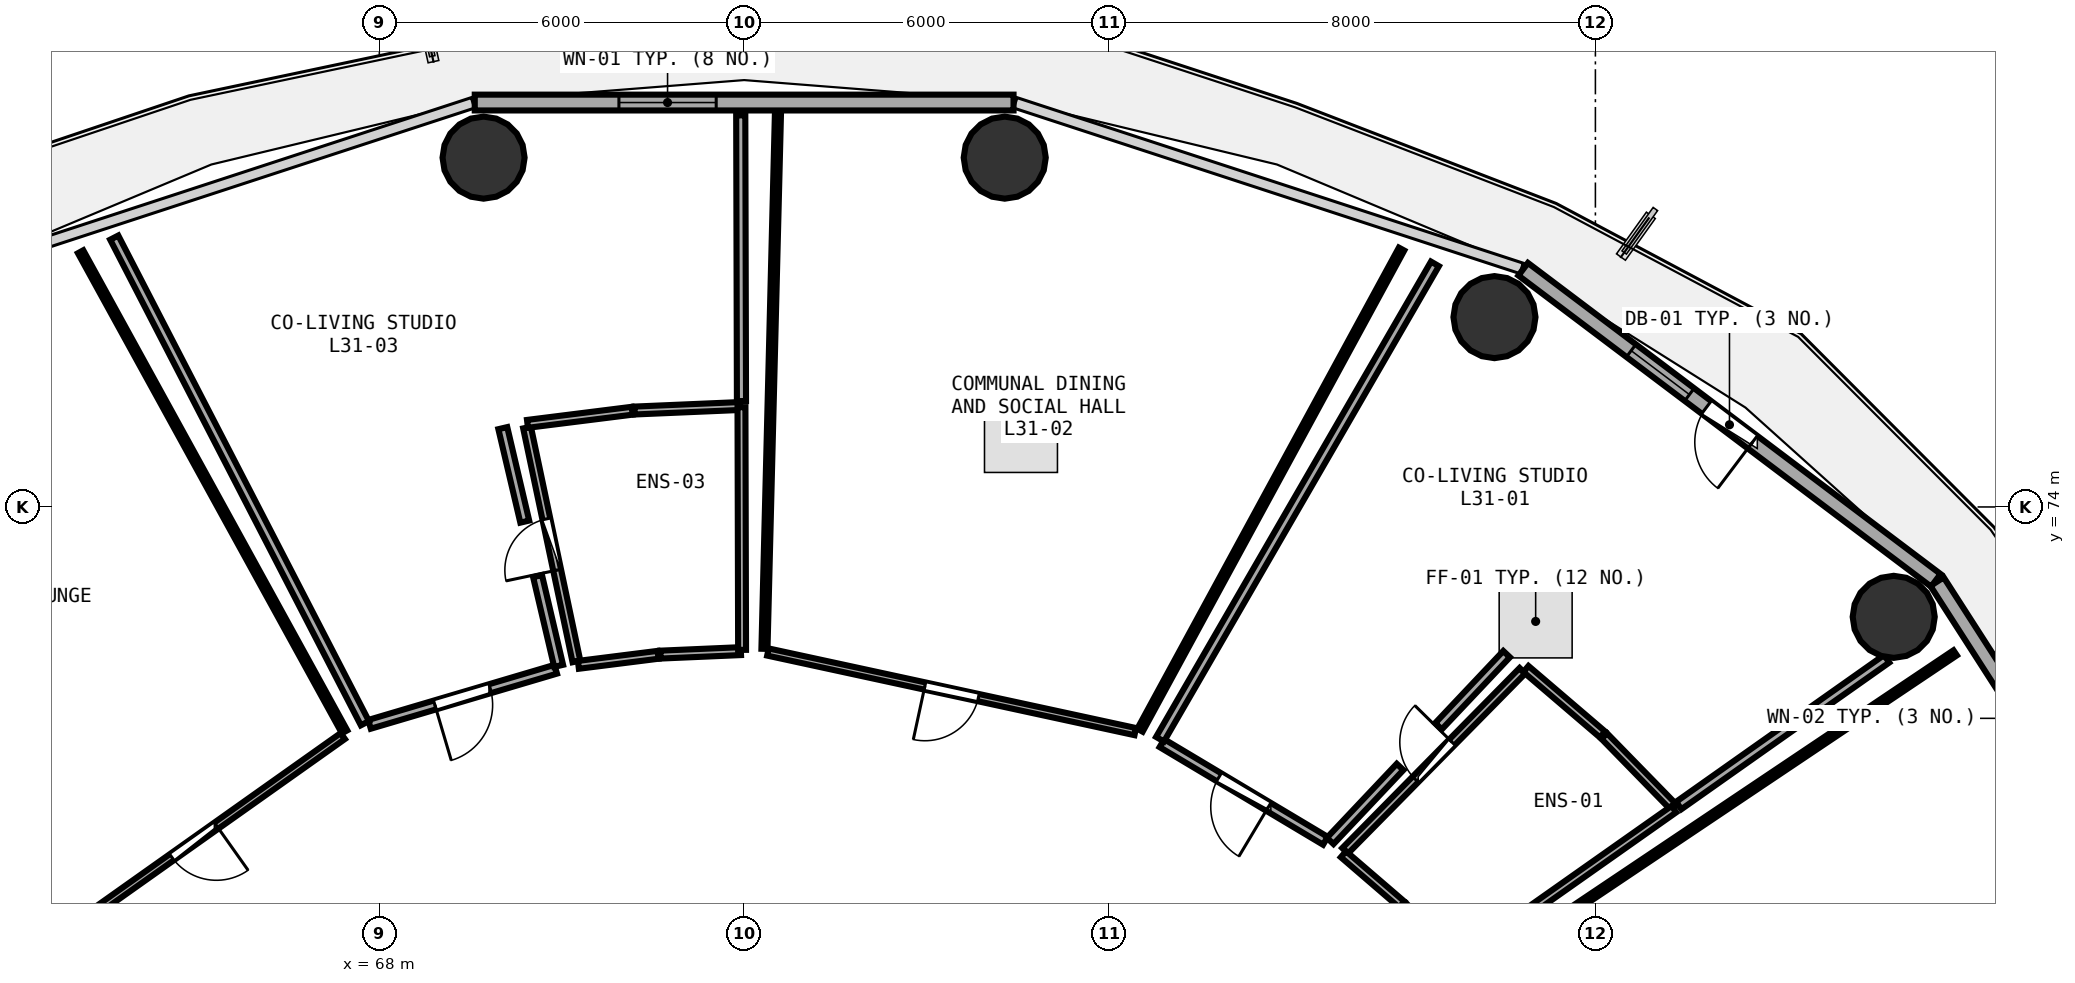
"""IFC4 building model, lengths in metres.
Left out: names, types, materials, properties, quantities, classifications, styles, units other than length and angle.
Written with IfcOpenShell. Run it as: python <this file> out.ifc"""

import sys

from ifc_helpers import new_model, si_unit, direction, frame, frame_2d, origin, origin_2d, place, context, subcontext, project, spatial, rectangle, circle, extrude, element, fill, save


model = new_model("IFC4")
c1 = context("Model", 3, precision=1e-05, world=origin(), true_north=direction((0.0, 1.0)))
c2 = subcontext(c1, "Body", "Model", "MODEL_VIEW")
j1 = project(units=[si_unit("LENGTHUNIT", "METRE"), si_unit("PLANEANGLEUNIT", "RADIAN")], contexts=[c1])
p1 = place(None, origin())
s1 = spatial("IfcSite", under=j1, at=p1, CompositionType="ELEMENT")
p2 = place(p1, origin())
s2 = spatial("IfcBuilding", under=s1, at=p2, CompositionType="ELEMENT")
p3 = place(p2, frame((0.0, 0.0, 121.35)))
s3 = spatial("IfcBuildingStorey", under=s2, at=p3, CompositionType="ELEMENT", Elevation=121.35)
for number, where, z_axis, x_axis in (
    (1, (92.906, 72.193, 0.0), (0.0, 0.0, 1.0), (1.0, 0.0, 0.0)),
    (2, (86.34, 77.122, 0.0), (0.0, 0.0, 1.0), (1.0, 0.0, 0.0)),
    (3, (78.286, 79.745, 0.0), (0.0, 0.0, 1.0), (1.0, 0.0, 0.0)),
    (4, (69.714, 79.745, 0.0), (0.0, 0.0, 1.0), (1.0, 0.0, 0.0)),
):
    element("IfcColumn", number, at=place(p3, frame(where, z_axis=z_axis, x_axis=x_axis)), inside=s3, PredefinedType="COLUMN", context=c2, shape_type="SweptSolid", body=[
        extrude(circle(Radius=0.675, at=origin_2d()), origin(), (0.0, 0.0, 1.0), 3.75),
    ])
p4 = place(p3, frame((98.048, 65.879, 0.0), z_axis=(0.0, 0.0, 1.0), x_axis=(-0.540620528459, 0.841266571432, 0.0)))
e5 = element("IfcWall", 5, at=p4, inside=s3, PredefinedType="SOLIDWALL", context=c2, shape_type="SweptSolid", body=[
    extrude(rectangle(XDim=8.193, YDim=0.26, at=frame_2d((4.096, 0.0))), origin(), (0.0, 0.0, 1.0), 3.475),
])
p5 = place(p4, frame((3.621, 0.0, 0.0)))
e6 = element("IfcOpeningElement", 6, at=p5, cuts=e5, PredefinedType="OPENING", context=c2, shape_type="SweptSolid", body=[
    extrude(rectangle(XDim=0.95, YDim=2.1, at=frame_2d((0.475, 1.05))), frame((0.0, 0.14, 0.0), z_axis=(0.0, -1.0, 0.0), x_axis=(1.0, 0.0, 0.0)), (0.0, 0.0, 1.0), 0.28),
])
p6 = place(p4, frame((4.921, 0.0, 0.85)))
e7 = element("IfcOpeningElement", 7, at=p6, cuts=e5, PredefinedType="OPENING", context=c2, shape_type="SweptSolid", body=[
    extrude(rectangle(XDim=1.2, YDim=1.45, at=frame_2d((0.6, 0.725))), frame((0.0, 0.14, 0.0), z_axis=(0.0, -1.0, 0.0), x_axis=(1.0, 0.0, 0.0)), (0.0, 0.0, 1.0), 0.28),
])
p7 = place(p3, frame((93.599, 72.793, 0.0), z_axis=(0.0, 0.0, 1.0), x_axis=(-0.798501507879, 0.601992808857, 0.0)))
e8 = element("IfcWall", 8, at=p7, inside=s3, PredefinedType="SOLIDWALL", context=c2, shape_type="SweptSolid", body=[
    extrude(rectangle(XDim=8.499, YDim=0.26, at=frame_2d((4.25, 0.0))), origin(), (0.0, 0.0, 1.0), 3.475),
])
p8 = place(p7, frame((3.775, 0.0, 0.0)))
e9 = element("IfcOpeningElement", 9, at=p8, cuts=e8, PredefinedType="OPENING", context=c2, shape_type="SweptSolid", body=[
    extrude(rectangle(XDim=0.95, YDim=2.1, at=frame_2d((0.475, 1.05))), frame((0.0, 0.14, 0.0), z_axis=(0.0, -1.0, 0.0), x_axis=(1.0, 0.0, 0.0)), (0.0, 0.0, 1.0), 0.28),
])
p9 = place(p7, frame((5.075, 0.0, 0.85)))
e10 = element("IfcOpeningElement", 10, at=p9, cuts=e8, PredefinedType="OPENING", context=c2, shape_type="SweptSolid", body=[
    extrude(rectangle(XDim=1.2, YDim=1.45, at=frame_2d((0.6, 0.725))), frame((0.0, 0.14, 0.0), z_axis=(0.0, -1.0, 0.0), x_axis=(1.0, 0.0, 0.0)), (0.0, 0.0, 1.0), 0.28),
])
p10 = place(p3, frame((78.43, 80.651, 0.0), z_axis=(0.0, 0.0, 1.0), x_axis=(-1.0, 0.0, 0.0)))
e11 = element("IfcWall", 11, at=p10, inside=s3, PredefinedType="SOLIDWALL", context=c2, shape_type="SweptSolid", body=[
    extrude(rectangle(XDim=8.861, YDim=0.26, at=frame_2d((4.43, 0.0))), origin(), (0.0, 0.0, 1.0), 3.475),
])
p11 = place(p10, frame((4.89, 0.0, 0.85)))
e12 = element("IfcOpeningElement", 12, at=p11, cuts=e11, PredefinedType="OPENING", context=c2, shape_type="SweptSolid", body=[
    extrude(rectangle(XDim=1.6, YDim=1.45, at=frame_2d((0.8, 0.725))), frame((0.0, 0.14, 0.0), z_axis=(0.0, -1.0, 0.0), x_axis=(1.0, 0.0, 0.0)), (0.0, 0.0, 1.0), 0.28),
])
p12 = place(p3, frame((83.883, 68.345, 0.0), z_axis=(0.0, 0.0, 1.0), x_axis=(0.70168270288, 0.712489567979, 0.0)))
e13 = element("IfcWall", 13, at=p12, inside=s3, PredefinedType="PLUMBINGWALL", context=c2, shape_type="SweptSolid", body=[
    extrude(rectangle(XDim=4.157, YDim=0.13, at=frame_2d((2.078, 0.0))), origin(), (0.0, 0.0, 1.0), 3.175),
])
p13 = place(p12, frame((1.648, 0.0, 0.0)))
e14 = element("IfcOpeningElement", 14, at=p13, cuts=e13, PredefinedType="OPENING", context=c2, shape_type="SweptSolid", body=[
    extrude(rectangle(XDim=0.86, YDim=2.05, at=frame_2d((0.43, 1.025))), frame((0.0, 0.075, 0.0), z_axis=(0.0, -1.0, 0.0), x_axis=(1.0, 0.0, 0.0)), (0.0, 0.0, 1.0), 0.15),
])
p14 = place(p3, frame((83.56, 68.51, 0.0), z_axis=(0.0, 0.0, 1.0), x_axis=(-0.858523244826, 0.512774646501, 0.0)))
e15 = element("IfcWall", 15, at=p14, inside=s3, PredefinedType="PARTITIONING", context=c2, shape_type="SweptSolid", body=[
    extrude(rectangle(XDim=3.131, YDim=0.15, at=frame_2d((1.565, 0.0))), origin(), (0.0, 0.0, 1.0), 2.925),
])
p15 = place(p14, frame((1.09, 0.0, 0.0)))
e16 = element("IfcOpeningElement", 16, at=p15, cuts=e15, PredefinedType="OPENING", context=c2, shape_type="SweptSolid", body=[
    extrude(rectangle(XDim=0.95, YDim=2.08, at=frame_2d((0.475, 1.04))), frame((0.0, 0.085, 0.0), z_axis=(0.0, -1.0, 0.0), x_axis=(1.0, 0.0, 0.0)), (0.0, 0.0, 1.0), 0.17),
])
p16 = place(p3, frame((80.432, 70.306, 0.0), z_axis=(0.0, 0.0, 1.0), x_axis=(-0.977331177519, 0.211716247484, 0.0)))
e17 = element("IfcWall", 17, at=p16, inside=s3, PredefinedType="PARTITIONING", context=c2, shape_type="SweptSolid", body=[
    extrude(rectangle(XDim=6.181, YDim=0.12, at=frame_2d((3.09, 0.0))), origin(), (0.0, 0.0, 1.0), 3.235),
])
p17 = place(p16, frame((2.64, 0.0, 0.0)))
e18 = element("IfcOpeningElement", 18, at=p17, cuts=e17, PredefinedType="OPENING", context=c2, shape_type="SweptSolid", body=[
    extrude(rectangle(XDim=0.9, YDim=2.08, at=frame_2d((0.45, 1.04))), frame((0.0, 0.07, 0.0), z_axis=(0.0, -1.0, 0.0), x_axis=(1.0, 0.0, 0.0)), (0.0, 0.0, 1.0), 0.14),
])
p18 = place(p3, frame((71.242, 71.46, 0.0), z_axis=(0.0, 0.0, 1.0), x_axis=(-0.206652168131, 0.97841447322, 0.0)))
e19 = element("IfcWall", 19, at=p18, inside=s3, PredefinedType="PLUMBINGWALL", context=c2, shape_type="SweptSolid", body=[
    extrude(rectangle(XDim=3.931, YDim=0.13, at=frame_2d((1.965, 0.0))), origin(), (0.0, 0.0, 1.0), 2.925),
])
p19 = place(p18, frame((1.535, 0.0, 0.0)))
e20 = element("IfcOpeningElement", 20, at=p19, cuts=e19, PredefinedType="OPENING", context=c2, shape_type="SweptSolid", body=[
    extrude(rectangle(XDim=0.86, YDim=2.05, at=frame_2d((0.43, 1.025))), frame((0.0, 0.075, 0.0), z_axis=(0.0, -1.0, 0.0), x_axis=(1.0, 0.0, 0.0)), (0.0, 0.0, 1.0), 0.15),
])
p20 = place(p3, frame((70.9, 71.331, 0.0), z_axis=(0.0, 0.0, 1.0), x_axis=(-0.958905255717, -0.283726471373, 0.0)))
e21 = element("IfcWall", 21, at=p20, inside=s3, PredefinedType="PARTITIONING", context=c2, shape_type="SweptSolid", body=[
    extrude(rectangle(XDim=3.193, YDim=0.15, at=frame_2d((1.597, 0.0))), origin(), (0.0, 0.0, 1.0), 2.925),
])
p21 = place(p20, frame((1.122, 0.0, 0.0)))
e22 = element("IfcOpeningElement", 22, at=p21, cuts=e21, PredefinedType="OPENING", context=c2, shape_type="SweptSolid", body=[
    extrude(rectangle(XDim=0.95, YDim=2.08, at=frame_2d((0.475, 1.04))), frame((0.0, 0.085, 0.0), z_axis=(0.0, -1.0, 0.0), x_axis=(1.0, 0.0, 0.0)), (0.0, 0.0, 1.0), 0.17),
])
p22 = place(p3, frame((67.399, 70.232, 0.0), z_axis=(0.0, 0.0, 1.0), x_axis=(-0.815932399176, -0.578147316846, 0.0)))
e23 = element("IfcWall", 23, at=p22, inside=s3, PredefinedType="PARTITIONING", context=c2, shape_type="SweptSolid", body=[
    extrude(rectangle(XDim=5.993, YDim=0.12, at=frame_2d((2.997, 0.0))), origin(), (0.0, 0.0, 1.0), 2.925),
])
p23 = place(p22, frame((2.546, 0.0, 0.0)))
e24 = element("IfcOpeningElement", 24, at=p23, cuts=e23, PredefinedType="OPENING", context=c2, shape_type="SweptSolid", body=[
    extrude(rectangle(XDim=0.9, YDim=2.08, at=frame_2d((0.45, 1.04))), frame((0.0, 0.07, 0.0), z_axis=(0.0, -1.0, 0.0), x_axis=(1.0, 0.0, 0.0)), (0.0, 0.0, 1.0), 0.14),
])
p24 = place(p3, frame((85.716, 66.536, 0.0), z_axis=(0.0, 0.0, 1.0), x_axis=(-0.695817197704, 0.718218927194, 0.0)))
e25 = element("IfcWall", 25, at=p24, inside=s3, PredefinedType="PLUMBINGWALL", context=c2, shape_type="SweptSolid", body=[
    extrude(rectangle(XDim=1.253, YDim=0.13, at=frame_2d((0.627, 0.0))), origin(), (0.0, 0.0, 1.0), 2.925),
])
p25 = place(p3, frame((84.815, 67.464, 0.0), z_axis=(0.0, 0.0, 1.0), x_axis=(-0.757933178543, 0.652332198242, 0.0)))
e26 = element("IfcWall", 26, at=p25, inside=s3, PredefinedType="PLUMBINGWALL", context=c2, shape_type="SweptSolid", body=[
    extrude(rectangle(XDim=1.265, YDim=0.13, at=frame_2d((0.632, 0.0))), origin(), (0.0, 0.0, 1.0), 3.48),
])
p26 = place(p3, frame((86.857, 71.336, 0.0), z_axis=(0.0, 0.0, 1.0), x_axis=(0.760056789813, -0.649856658241, 0.0)))
e27 = element("IfcWall", 27, at=p26, inside=s3, PredefinedType="PLUMBINGWALL", context=c2, shape_type="SweptSolid", body=[
    extrude(rectangle(XDim=1.657, YDim=0.13, at=frame_2d((0.829, 0.0))), origin(), (0.0, 0.0, 1.0), 3.48),
])
p27 = place(p3, frame((88.146, 70.232, 0.0), z_axis=(0.0, 0.0, 1.0), x_axis=(0.698431593966, -0.715676818508, 0.0)))
e28 = element("IfcWall", 28, at=p27, inside=s3, PredefinedType="PLUMBINGWALL", context=c2, shape_type="SweptSolid", body=[
    extrude(rectangle(XDim=1.642, YDim=0.13, at=frame_2d((0.821, 0.0))), origin(), (0.0, 0.0, 1.0), 2.925),
])
p28 = place(p3, frame((89.291, 69.031, 0.0), z_axis=(0.0, 0.0, 1.0), x_axis=(-0.817498099131, -0.575931296178, 0.0)))
e29 = element("IfcWall", 29, at=p28, inside=s3, PredefinedType="PLUMBINGWALL", context=c2, shape_type="SweptSolid", body=[
    extrude(rectangle(XDim=4.336, YDim=0.13, at=frame_2d((2.168, 0.0))), origin(), (0.0, 0.0, 1.0), 3.175),
])
p29 = place(p3, frame((80.84, 70.181, 0.0), z_axis=(0.0, 0.0, 1.0), x_axis=(0.500668535271, 0.865639080558, 0.0)))
e30 = element("IfcWall", 30, at=p29, inside=s3, PredefinedType="PARTITIONING", context=c2, shape_type="SweptSolid", body=[
    extrude(rectangle(XDim=9.03, YDim=0.15, at=frame_2d((4.515, 0.0))), origin(), (0.0, 0.0, 1.0), 2.925),
])
p30 = place(p3, frame((92.79, 71.502, 0.0), z_axis=(0.0, 0.0, 1.0), x_axis=(-0.817102044885, -0.576493060015, 0.0)))
e31 = element("IfcWall", 31, at=p30, inside=s3, PredefinedType="PARTITIONING", context=c2, shape_type="SweptSolid", body=[
    extrude(rectangle(XDim=4.185, YDim=0.15, at=frame_2d((2.092, 0.0))), origin(), (0.0, 0.0, 1.0), 3.235),
])
p31 = place(p3, frame((86.54, 71.58, 0.0), z_axis=(0.0, 0.0, 1.0), x_axis=(-0.68661474407, -0.727021453071, 0.0)))
e32 = element("IfcWall", 32, at=p31, inside=s3, PredefinedType="PARTITIONING", context=c2, shape_type="SweptSolid", body=[
    extrude(rectangle(XDim=1.631, YDim=0.15, at=frame_2d((0.816, 0.0))), origin(), (0.0, 0.0, 1.0), 3.175),
])
p32 = place(p3, frame((84.788, 69.725, 0.0), z_axis=(0.0, 0.0, 1.0), x_axis=(-0.686614966265, -0.727021243226, 0.0)))
e33 = element("IfcWall", 33, at=p32, inside=s3, PredefinedType="PARTITIONING", context=c2, shape_type="SweptSolid", body=[
    extrude(rectangle(XDim=1.674, YDim=0.15, at=frame_2d((0.837, 0.0))), origin(), (0.0, 0.0, 1.0), 3.235),
])
p33 = place(p3, frame((74.334, 71.667, 0.0), z_axis=(0.0, 0.0, 1.0), x_axis=(0.025193894125, 0.999682583473, 0.0)))
e34 = element("IfcWall", 34, at=p33, inside=s3, PredefinedType="PARTITIONING", context=c2, shape_type="SweptSolid", body=[
    extrude(rectangle(XDim=8.77, YDim=0.1, at=frame_2d((4.385, 0.0))), origin(), (0.0, 0.0, 1.0), 2.975),
])
p34 = place(p3, frame((84.812, 78.241, 0.0), z_axis=(0.0, 0.0, 1.0), x_axis=(-0.477645693392, -0.878552554822, 0.0)))
e35 = element("IfcWall", 35, at=p34, inside=s3, PredefinedType="PARTITIONING", context=c2, shape_type="SweptSolid", body=[
    extrude(rectangle(XDim=9.007, YDim=0.1, at=frame_2d((4.503, 0.0))), origin(), (0.0, 0.0, 1.0), 2.925),
])
p35 = place(p3, frame((73.946, 71.629, 0.0), z_axis=(0.0, 0.0, 1.0), x_axis=(-0.999067611154, -0.043173004803, 0.0)))
e36 = element("IfcWall", 36, at=p35, inside=s3, PredefinedType="PLUMBINGWALL", context=c2, shape_type="SweptSolid", body=[
    extrude(rectangle(XDim=1.323, YDim=0.13, at=frame_2d((0.662, 0.0))), origin(), (0.0, 0.0, 1.0), 3.48),
])
p36 = place(p3, frame((72.584, 71.569, 0.0), z_axis=(0.0, 0.0, 1.0), x_axis=(-0.992163718395, -0.124944611333, 0.0)))
e37 = element("IfcWall", 37, at=p36, inside=s3, PredefinedType="PLUMBINGWALL", context=c2, shape_type="SweptSolid", body=[
    extrude(rectangle(XDim=1.321, YDim=0.13, at=frame_2d((0.66, 0.0))), origin(), (0.0, 0.0, 1.0), 3.48),
])
p37 = place(p3, frame((70.437, 75.366, 0.0), z_axis=(0.0, 0.0, 1.0), x_axis=(0.992223689582, 0.124467464958, 0.0)))
e38 = element("IfcWall", 38, at=p37, inside=s3, PredefinedType="PLUMBINGWALL", context=c2, shape_type="SweptSolid", body=[
    extrude(rectangle(XDim=1.736, YDim=0.13, at=frame_2d((0.868, 0.0))), origin(), (0.0, 0.0, 1.0), 2.925),
])
p38 = place(p3, frame((72.199, 75.586, 0.0), z_axis=(0.0, 0.0, 1.0), x_axis=(0.999088465239, 0.04268768706, 0.0)))
e39 = element("IfcWall", 39, at=p38, inside=s3, PredefinedType="PLUMBINGWALL", context=c2, shape_type="SweptSolid", body=[
    extrude(rectangle(XDim=1.739, YDim=0.13, at=frame_2d((0.869, 0.0))), origin(), (0.0, 0.0, 1.0), 3.48),
])
p39 = place(p3, frame((73.956, 75.641, 0.0), z_axis=(0.0, 0.0, 1.0), x_axis=(0.002507944156, -0.999996855103, 0.0)))
e40 = element("IfcWall", 40, at=p39, inside=s3, PredefinedType="PLUMBINGWALL", context=c2, shape_type="SweptSolid", body=[
    extrude(rectangle(XDim=3.991, YDim=0.13, at=frame_2d((1.996, 0.0))), origin(), (0.0, 0.0, 1.0), 3.175),
])
p40 = place(p3, frame((67.763, 70.444, 0.0), z_axis=(0.0, 0.0, 1.0), x_axis=(-0.458694817529, 0.888593869196, 0.0)))
e41 = element("IfcWall", 41, at=p40, inside=s3, PredefinedType="PARTITIONING", context=c2, shape_type="SweptSolid", body=[
    extrude(rectangle(XDim=8.987, YDim=0.15, at=frame_2d((4.494, 0.0))), origin(), (0.0, 0.0, 1.0), 2.975),
])
p41 = place(p3, frame((73.944, 80.44, 0.0), z_axis=(0.0, 0.0, 1.0), x_axis=(0.002493887397, -0.999996890258, 0.0)))
e42 = element("IfcWall", 42, at=p41, inside=s3, PredefinedType="PARTITIONING", context=c2, shape_type="SweptSolid", body=[
    extrude(rectangle(XDim=4.699, YDim=0.15, at=frame_2d((2.35, 0.0))), origin(), (0.0, 0.0, 1.0), 2.975),
])
p42 = place(p3, frame((70.031, 75.296, 0.0), z_axis=(0.0, 0.0, 1.0), x_axis=(0.228651551475, -0.973508329707, 0.0)))
e43 = element("IfcWall", 43, at=p42, inside=s3, PredefinedType="PARTITIONING", context=c2, shape_type="SweptSolid", body=[
    extrude(rectangle(XDim=1.579, YDim=0.15, at=frame_2d((0.79, 0.0))), origin(), (0.0, 0.0, 1.0), 2.925),
])
p43 = place(p3, frame((70.602, 72.863, 0.0), z_axis=(0.0, 0.0, 1.0), x_axis=(0.228680272693, -0.973501583399, 0.0)))
e44 = element("IfcWall", 44, at=p43, inside=s3, PredefinedType="PARTITIONING", context=c2, shape_type="SweptSolid", body=[
    extrude(rectangle(XDim=1.516, YDim=0.15, at=frame_2d((0.758, 0.0))), origin(), (0.0, 0.0, 1.0), 2.925),
])
p44 = place(p3, frame((63.087, 78.197, 0.0), z_axis=(0.0, 0.0, 1.0), x_axis=(0.481837612944, -0.876260529039, 0.0)))
e45 = element("IfcWall", 45, at=p44, inside=s3, PredefinedType="PARTITIONING", context=c2, shape_type="SweptSolid", body=[
    extrude(rectangle(XDim=9.01, YDim=0.1, at=frame_2d((4.505, 0.0))), origin(), (0.0, 0.0, 1.0), 2.975),
])
p45 = place(p3, frame((85.989, 66.282, 0.0), z_axis=(0.0, 0.0, 1.0), x_axis=(0.830433607217, 0.557117603388, 0.0)))
e46 = element("IfcWall", 46, at=p45, inside=s3, PredefinedType="PARTITIONING", context=c2, shape_type="SweptSolid", body=[
    extrude(rectangle(XDim=9.546, YDim=0.1, at=frame_2d((4.773, 0.0))), origin(), (0.0, 0.0, 1.0), 2.975),
])
p46 = place(p8, frame((0.95, 0.0, 0.0), z_axis=(0.0, 0.0, 1.0), x_axis=(-1.0, 0.0, 0.0)))
e47 = element("IfcDoor", 47, at=p46, inside=s3, OperationType="SINGLE_SWING_RIGHT", PredefinedType="DOOR", context=c2, shape_type="SweptSolid", body=[
    extrude(rectangle(XDim=0.95, YDim=2.1, at=frame_2d((0.475, 1.05))), frame((0.0, 0.025, 0.0), z_axis=(0.0, -1.0, 0.0), x_axis=(1.0, 0.0, 0.0)), (0.0, 0.0, 1.0), 0.05),
])
fill(e9, e47)
p47 = place(p9, origin())
e48 = element("IfcWindow", 48, at=p47, inside=s3, PartitioningType="SINGLE_PANEL", PredefinedType="WINDOW", context=c2, shape_type="SweptSolid", body=[
    extrude(rectangle(XDim=1.2, YDim=1.45, at=frame_2d((0.6, 0.725))), frame((0.0, 0.03, 0.0), z_axis=(0.0, -1.0, 0.0), x_axis=(1.0, 0.0, 0.0)), (0.0, 0.0, 1.0), 0.06),
])
fill(e10, e48)
p48 = place(p11, origin())
e49 = element("IfcWindow", 49, at=p48, inside=s3, PartitioningType="SINGLE_PANEL", PredefinedType="WINDOW", context=c2, shape_type="SweptSolid", body=[
    extrude(rectangle(XDim=1.6, YDim=1.45, at=frame_2d((0.8, 0.725))), frame((0.0, 0.03, 0.0), z_axis=(0.0, -1.0, 0.0), x_axis=(1.0, 0.0, 0.0)), (0.0, 0.0, 1.0), 0.06),
])
fill(e12, e49)
p49 = place(p13, origin())
e50 = element("IfcDoor", 50, at=p49, inside=s3, OperationType="SINGLE_SWING_RIGHT", PredefinedType="DOOR", context=c2, shape_type="SweptSolid", body=[
    extrude(rectangle(XDim=0.86, YDim=2.05, at=frame_2d((0.43, 1.025))), frame((0.0, 0.025, 0.0), z_axis=(0.0, -1.0, 0.0), x_axis=(1.0, 0.0, 0.0)), (0.0, 0.0, 1.0), 0.05),
])
fill(e14, e50)
p50 = place(p15, origin())
e51 = element("IfcDoor", 51, at=p50, inside=s3, OperationType="SINGLE_SWING_LEFT", PredefinedType="DOOR", context=c2, shape_type="SweptSolid", body=[
    extrude(rectangle(XDim=0.95, YDim=2.08, at=frame_2d((0.475, 1.04))), frame((0.0, 0.025, 0.0), z_axis=(0.0, -1.0, 0.0), x_axis=(1.0, 0.0, 0.0)), (0.0, 0.0, 1.0), 0.05),
])
fill(e16, e51)
p51 = place(p17, origin())
e52 = element("IfcDoor", 52, at=p51, inside=s3, OperationType="SINGLE_SWING_RIGHT", PredefinedType="DOOR", context=c2, shape_type="SweptSolid", body=[
    extrude(rectangle(XDim=0.9, YDim=2.08, at=frame_2d((0.45, 1.04))), frame((0.0, 0.025, 0.0), z_axis=(0.0, -1.0, 0.0), x_axis=(1.0, 0.0, 0.0)), (0.0, 0.0, 1.0), 0.05),
])
fill(e18, e52)
p52 = place(p19, origin())
e53 = element("IfcDoor", 53, at=p52, inside=s3, OperationType="SINGLE_SWING_LEFT", PredefinedType="DOOR", context=c2, shape_type="SweptSolid", body=[
    extrude(rectangle(XDim=0.86, YDim=2.05, at=frame_2d((0.43, 1.025))), frame((0.0, 0.025, 0.0), z_axis=(0.0, -1.0, 0.0), x_axis=(1.0, 0.0, 0.0)), (0.0, 0.0, 1.0), 0.05),
])
fill(e20, e53)
p53 = place(p21, origin())
e54 = element("IfcDoor", 54, at=p53, inside=s3, OperationType="SINGLE_SWING_RIGHT", PredefinedType="DOOR", context=c2, shape_type="SweptSolid", body=[
    extrude(rectangle(XDim=0.95, YDim=2.08, at=frame_2d((0.475, 1.04))), frame((0.0, 0.025, 0.0), z_axis=(0.0, -1.0, 0.0), x_axis=(1.0, 0.0, 0.0)), (0.0, 0.0, 1.0), 0.05),
])
fill(e22, e54)
p54 = place(p23, origin())
e55 = element("IfcDoor", 55, at=p54, inside=s3, OperationType="SINGLE_SWING_LEFT", PredefinedType="DOOR", context=c2, shape_type="SweptSolid", body=[
    extrude(rectangle(XDim=0.9, YDim=2.08, at=frame_2d((0.45, 1.04))), frame((0.0, 0.025, 0.0), z_axis=(0.0, -1.0, 0.0), x_axis=(1.0, 0.0, 0.0)), (0.0, 0.0, 1.0), 0.05),
])
fill(e24, e55)
save(model, sys.argv[1])
